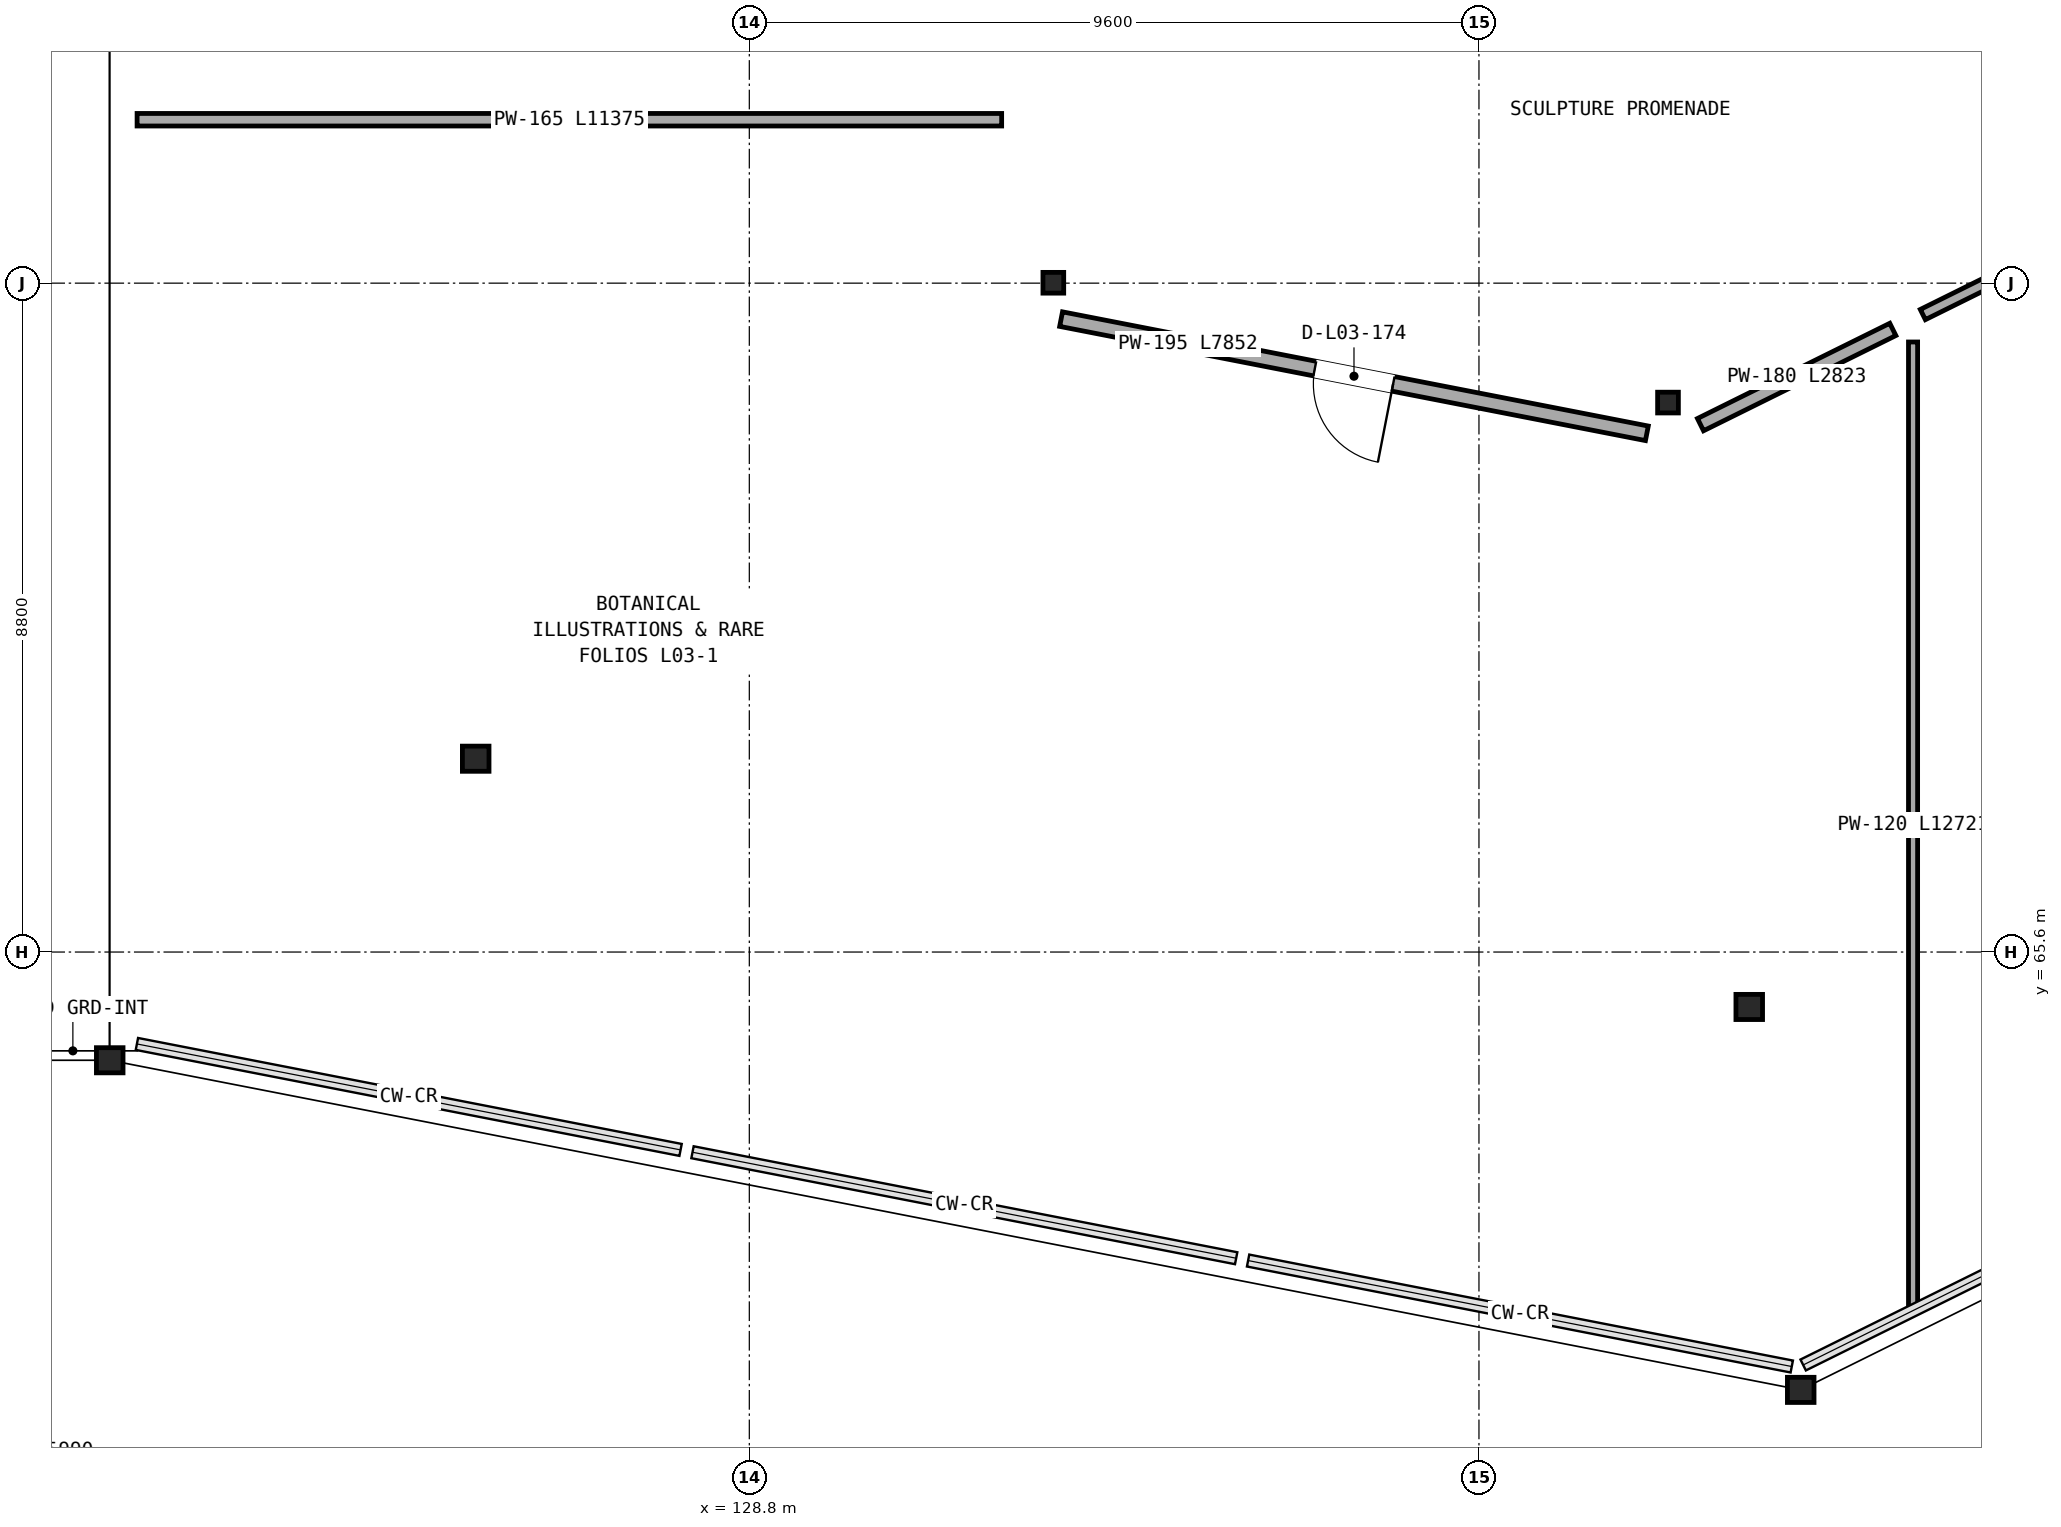
"""IFC4 building model, lengths in metres.
Left out: names, types, materials, properties, quantities, classifications, styles, units other than length and angle.
Written with IfcOpenShell. Run it as: python <this file> out.ifc"""

import sys

from ifc_helpers import new_model, si_unit, direction, frame, frame_2d, origin, origin_2d, place, context, subcontext, project, spatial, rectangle, hollow_circle, i_section, extrude, element, fill, save


model = new_model("IFC4")
c1 = context("Model", 3, precision=1e-05, world=origin(), true_north=direction((0.0, 1.0)))
c2 = subcontext(c1, "Body", "Model", "MODEL_VIEW")
j1 = project(units=[si_unit("LENGTHUNIT", "METRE"), si_unit("PLANEANGLEUNIT", "RADIAN")], contexts=[c1])
p1 = place(None, origin())
s1 = spatial("IfcSite", under=j1, at=p1, CompositionType="ELEMENT")
p2 = place(p1, origin())
s2 = spatial("IfcBuilding", under=s1, at=p2, CompositionType="ELEMENT")
p3 = place(p2, frame((0.0, 0.0, 14.6)))
s3 = spatial("IfcBuildingStorey", under=s2, at=p3, CompositionType="ELEMENT", Elevation=14.6)
p4 = place(p3, frame((120.385, 64.176, 0.0), z_axis=(0.129745588293, 0.106909081202, 0.985766975849), x_axis=(-0.63591908935, 0.771755733248, 0.0)))
e1 = element("IfcColumn", 1, at=p4, inside=s3, PredefinedType="COLUMN", context=c2, shape_type="SweptSolid", body=[
    extrude(i_section(OverallWidth=0.35, OverallDepth=0.331, WebThickness=0.02, FlangeThickness=0.028, at=origin_2d()), origin(), (0.0, 0.0, 1.0), 4.565),
])
p5 = place(p3, frame((125.2, 68.143, 0.0), z_axis=(0.0, 0.0, 1.0), x_axis=(1.0, 0.0, 0.0)))
e2 = element("IfcColumn", 2, at=p5, inside=s3, PredefinedType="COLUMN", context=c2, shape_type="SweptSolid", body=[
    extrude(i_section(OverallWidth=0.35, OverallDepth=0.331, WebThickness=0.02, FlangeThickness=0.028, at=origin_2d()), origin(), (0.0, 0.0, 1.0), 4.5),
])
p6 = place(p3, frame((132.8, 74.405, 0.0), z_axis=(0.0, 0.0, 1.0), x_axis=(1.0, 0.0, 0.0)))
e3 = element("IfcColumn", 3, at=p6, inside=s3, PredefinedType="COLUMN", context=c2, shape_type="SweptSolid", body=[
    extrude(hollow_circle(Radius=0.136, WallThickness=0.009, at=origin_2d()), origin(), (0.0, 0.0, 1.0), 4.5),
])
p7 = place(p3, frame((142.633, 59.84, 0.0), z_axis=(-0.018324293491, 0.136438067961, 0.990479113298), x_axis=(-0.99110130958, -0.133109707194, 0.0)))
e4 = element("IfcColumn", 4, at=p7, inside=s3, PredefinedType="COLUMN", context=c2, shape_type="SweptSolid", body=[
    extrude(i_section(OverallWidth=0.35, OverallDepth=0.331, WebThickness=0.02, FlangeThickness=0.028, at=origin_2d()), origin(), (0.0, 0.0, 1.0), 4.543),
])
p8 = place(p3, frame((141.956, 64.877, 0.0), z_axis=(0.0, 0.0, 1.0), x_axis=(1.0, 0.0, 0.0)))
e5 = element("IfcColumn", 5, at=p8, inside=s3, PredefinedType="COLUMN", context=c2, shape_type="SweptSolid", body=[
    extrude(i_section(OverallWidth=0.35, OverallDepth=0.331, WebThickness=0.02, FlangeThickness=0.028, at=origin_2d()), origin(), (0.0, 0.0, 1.0), 4.5),
])
p9 = place(p3, frame((140.887, 72.829, 0.0), z_axis=(0.0, 0.0, 1.0), x_axis=(1.0, 0.0, 0.0)))
e6 = element("IfcColumn", 6, at=p9, inside=s3, PredefinedType="COLUMN", context=c2, shape_type="SweptSolid", body=[
    extrude(hollow_circle(Radius=0.136, WallThickness=0.009, at=origin_2d()), origin(), (0.0, 0.0, 1.0), 4.5),
])
p10 = place(p3, frame((132.902, 73.927, 0.0), z_axis=(0.0, 0.0, 1.0), x_axis=(0.98152920164, -0.191312378918, 0.0)))
e7 = element("IfcWall", 7, at=p10, inside=s3, PredefinedType="PARTITIONING", context=c2, shape_type="SweptSolid", body=[
    extrude(rectangle(XDim=7.852, YDim=0.195, at=frame_2d((3.926, 0.0))), origin(), (0.0, 0.0, 1.0), 4.13),
])
p11 = place(p10, frame((3.401, 0.0, 0.0)))
e8 = element("IfcOpeningElement", 8, at=p11, cuts=e7, PredefinedType="OPENING", context=c2, shape_type="SweptSolid", body=[
    extrude(rectangle(XDim=1.05, YDim=2.15, at=frame_2d((0.525, 1.075))), frame((0.0, 0.107, 0.0), z_axis=(0.0, -1.0, 0.0), x_axis=(1.0, 0.0, 0.0)), (0.0, 0.0, 1.0), 0.215),
])
p12 = place(p3, frame((141.315, 72.538, 0.0), z_axis=(0.0, 0.0, 1.0), x_axis=(0.896166879806, 0.443717166152, 0.0)))
e9 = element("IfcWall", 9, at=p12, inside=s3, PredefinedType="PARTITIONING", context=c2, shape_type="SweptSolid", body=[
    extrude(rectangle(XDim=2.824, YDim=0.18, at=frame_2d((1.412, 0.0))), origin(), (0.0, 0.0, 1.0), 4.13),
])
p13 = place(p3, frame((120.745, 76.55, 0.0), z_axis=(0.0, 0.0, 1.0), x_axis=(1.0, 0.0, 0.0)))
e10 = element("IfcWall", 10, at=p13, inside=s3, PredefinedType="PARTITIONING", context=c2, shape_type="SweptSolid", body=[
    extrude(rectangle(XDim=11.375, YDim=0.165, at=frame_2d((5.688, 0.0))), origin(), (0.0, 0.0, 1.0), 3.51),
])
p14 = place(p3, frame((144.24, 73.987, 0.0), z_axis=(0.0, 0.0, 1.0), x_axis=(0.896170047081, 0.443710769212, 0.0)))
e11 = element("IfcWall", 11, at=p14, inside=s3, PredefinedType="PARTITIONING", context=c2, shape_type="SweptSolid", body=[
    extrude(rectangle(XDim=8.623, YDim=0.15, at=frame_2d((4.312, 0.0))), origin(), (0.0, 0.0, 1.0), 4.13),
])
p15 = place(p3, frame((144.111, 73.626, 0.0), z_axis=(0.0, 0.0, 1.0), x_axis=(0.0, -1.0, 0.0)))
e12 = element("IfcWall", 12, at=p15, inside=s3, PredefinedType="PARTITIONING", context=c2, shape_type="SweptSolid", body=[
    extrude(rectangle(XDim=12.721, YDim=0.12, at=frame_2d((6.361, 0.0))), origin(), (0.0, 0.0, 1.0), 2.75),
])
p16 = place(p11, frame((1.05, 0.0, 0.0), z_axis=(0.0, 0.0, 1.0), x_axis=(-1.0, 0.0, 0.0)))
e13 = element("IfcDoor", 13, at=p16, inside=s3, OperationType="SINGLE_SWING_RIGHT", PredefinedType="DOOR", context=c2, shape_type="SweptSolid", body=[
    extrude(rectangle(XDim=1.05, YDim=2.15, at=frame_2d((0.525, 1.075))), frame((0.0, 0.025, 0.0), z_axis=(0.0, -1.0, 0.0), x_axis=(1.0, 0.0, 0.0)), (0.0, 0.0, 1.0), 0.05),
])
fill(e8, e13)
save(model, sys.argv[1])
